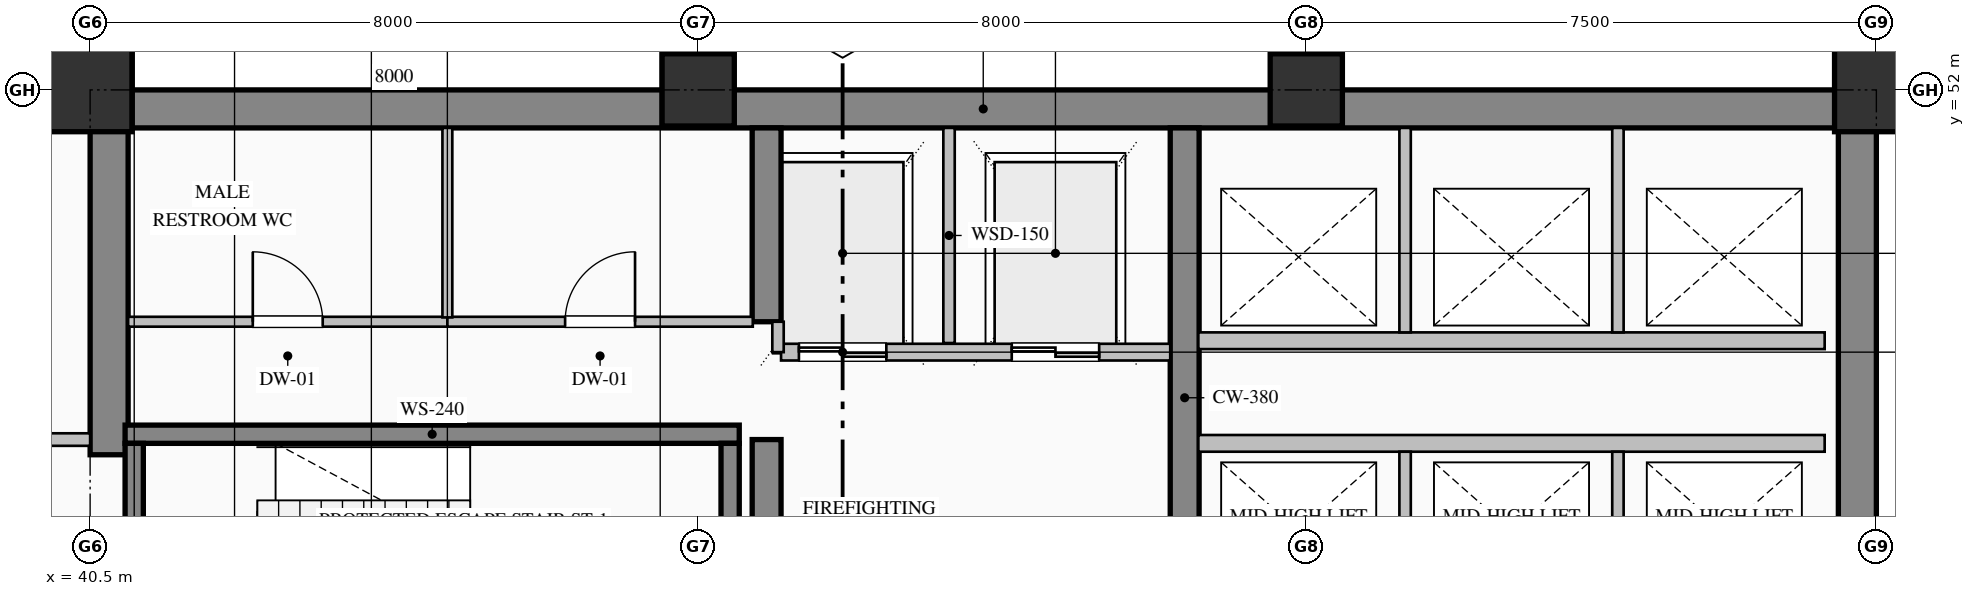
"""IFC4 building model, lengths in metres.
Left out: names, types, materials, properties, quantities, classifications, styles, units other than length and angle.
Written with IfcOpenShell. Run it as: python <this file> out.ifc"""

import sys

from ifc_helpers import new_model, si_unit, direction, frame, frame_2d, origin, origin_2d, place, context, subcontext, project, spatial, rectangle, hollow_rectangle, extrude, element, fill, save


model = new_model("IFC4")
c1 = context("Model", 3, precision=1e-05, world=origin(), true_north=direction((0.0, 1.0)))
c2 = subcontext(c1, "Body", "Model", "MODEL_VIEW")
j1 = project(units=[si_unit("LENGTHUNIT", "METRE"), si_unit("PLANEANGLEUNIT", "RADIAN")], contexts=[c1])
p1 = place(None, origin())
s1 = spatial("IfcSite", under=j1, at=p1, CompositionType="ELEMENT")
p2 = place(p1, origin())
s2 = spatial("IfcBuilding", under=s1, at=p2, CompositionType="ELEMENT")
p3 = place(p2, frame((0.0, 0.0, 135.0)))
s3 = spatial("IfcBuildingStorey", under=s2, at=p3, CompositionType="ELEMENT", Elevation=135.0)
p4 = place(p3, frame((40.5, 51.75, 0.0), z_axis=(0.0, 0.0, 1.0), x_axis=(1.0, 0.0, 0.0)))
e1 = element("IfcWall", 1, at=p4, inside=s3, PredefinedType="SHEAR", context=c2, shape_type="SweptSolid", body=[
    extrude(rectangle(XDim=23.5, YDim=0.5, at=frame_2d((11.75, 0.0))), origin(), (0.0, 0.0, 1.0), 3.765),
])
p5 = place(p3, frame((63.75, 36.32, 0.0), z_axis=(0.0, 0.0, 1.0), x_axis=(0.0, 1.0, 0.0)))
e2 = element("IfcWall", 2, at=p5, inside=s3, PredefinedType="SHEAR", context=c2, shape_type="SweptSolid", body=[
    extrude(rectangle(XDim=15.18, YDim=0.5, at=frame_2d((7.59, 0.0))), origin(), (0.0, 0.0, 1.0), 3.765),
])
p6 = place(p3, frame((40.75, 47.2, 0.0), z_axis=(0.0, 0.0, 1.0), x_axis=(0.0, 1.0, 0.0)))
e3 = element("IfcWall", 3, at=p6, inside=s3, PredefinedType="SHEAR", context=c2, shape_type="SweptSolid", body=[
    extrude(rectangle(XDim=4.3, YDim=0.5, at=frame_2d((2.15, 0.0))), origin(), (0.0, 0.0, 1.0), 3.765),
])
p7 = place(p3, frame((49.4, 44.4, 0.0), z_axis=(0.0, 0.0, 1.0), x_axis=(0.0, 1.0, 0.0)))
e4 = element("IfcWall", 4, at=p7, inside=s3, PredefinedType="SHEAR", context=c2, shape_type="SweptSolid", body=[
    extrude(rectangle(XDim=3.0, YDim=0.38, at=frame_2d((1.5, 0.0))), origin(), (0.0, 0.0, 1.0), 3.765),
])
p8 = place(p3, frame((49.4, 48.95, 0.0), z_axis=(0.0, 0.0, 1.0), x_axis=(0.0, 1.0, 0.0)))
e5 = element("IfcWall", 5, at=p8, inside=s3, PredefinedType="SHEAR", context=c2, shape_type="SweptSolid", body=[
    extrude(rectangle(XDim=2.55, YDim=0.38, at=frame_2d((1.275, 0.0))), origin(), (0.0, 0.0, 1.0), 3.765),
])
p9 = place(p3, frame((54.9, 44.4, 0.0), z_axis=(0.0, 0.0, 1.0), x_axis=(0.0, 1.0, 0.0)))
e6 = element("IfcWall", 6, at=p9, inside=s3, PredefinedType="SHEAR", context=c2, shape_type="SweptSolid", body=[
    extrude(rectangle(XDim=7.1, YDim=0.38, at=frame_2d((3.55, 0.0))), origin(), (0.0, 0.0, 1.0), 3.765),
])
p10 = place(p3, frame((40.5, 52.0, 0.0), z_axis=(0.0, 0.0, 1.0), x_axis=(1.0, 0.0, 0.0)))
e7 = element("IfcColumn", 7, at=p10, inside=s3, PredefinedType="COLUMN", context=c2, shape_type="SweptSolid", body=[
    extrude(hollow_rectangle(XDim=1.1, YDim=1.1, WallThickness=0.04, at=origin_2d()), origin(), (0.0, 0.0, 1.0), 4.0),
])
for number, where, z_axis, x_axis in (
    (8, (48.5, 52.0, 0.0), (0.0, 0.0, 1.0), (1.0, 0.0, 0.0)),
    (9, (56.5, 52.0, 0.0), (0.0, 0.0, 1.0), (1.0, 0.0, 0.0)),
):
    element("IfcColumn", number, at=place(p3, frame(where, z_axis=z_axis, x_axis=x_axis)), inside=s3, PredefinedType="COLUMN", context=c2, shape_type="SweptSolid", body=[
        extrude(hollow_rectangle(XDim=0.95, YDim=0.95, WallThickness=0.036, at=origin_2d()), origin(), (0.0, 0.0, 1.0), 4.0),
    ])
p11 = place(p3, frame((64.0, 52.0, 0.0), z_axis=(0.0, 0.0, 1.0), x_axis=(1.0, 0.0, 0.0)))
e10 = element("IfcColumn", 10, at=p11, inside=s3, PredefinedType="COLUMN", context=c2, shape_type="SweptSolid", body=[
    extrude(hollow_rectangle(XDim=1.1, YDim=1.1, WallThickness=0.04, at=origin_2d()), origin(), (0.0, 0.0, 1.0), 4.0),
])
p12 = place(p3, frame((13.0, 51.83, 0.0), z_axis=(0.0, 0.0, 1.0), x_axis=(1.0, 0.0, 0.0)))
e11 = element("IfcWall", 11, at=p12, inside=s3, PredefinedType="SOLIDWALL", context=c2, shape_type="SweptSolid", body=[
    extrude(rectangle(XDim=27.52, YDim=0.34, at=frame_2d((13.76, 0.0))), origin(), (0.0, 0.0, 1.0), 3.265),
])
p13 = place(p12, frame((6.6, 0.0, 0.7)))
e12 = element("IfcOpeningElement", 12, at=p13, cuts=e11, PredefinedType="OPENING", context=c2, shape_type="SweptSolid", body=[
    extrude(rectangle(XDim=1.2, YDim=1.85, at=frame_2d((0.6, 0.925))), frame((0.0, 0.18, 0.0), z_axis=(0.0, -1.0, 0.0), x_axis=(1.0, 0.0, 0.0)), (0.0, 0.0, 1.0), 0.36),
])
p14 = place(p12, frame((13.575, 0.0, 0.85)))
e13 = element("IfcOpeningElement", 13, at=p14, cuts=e11, PredefinedType="OPENING", context=c2, shape_type="SweptSolid", body=[
    extrude(rectangle(XDim=1.65, YDim=1.95, at=frame_2d((0.825, 0.975))), frame((0.0, 0.18, 0.0), z_axis=(0.0, -1.0, 0.0), x_axis=(1.0, 0.0, 0.0)), (0.0, 0.0, 1.0), 0.36),
])
p15 = place(p3, frame((40.96, 47.47, 0.0), z_axis=(0.0, 0.0, 1.0), x_axis=(1.0, 0.0, 0.0)))
e14 = element("IfcWall", 14, at=p15, inside=s3, PredefinedType="SOLIDWALL", context=c2, shape_type="SweptSolid", body=[
    extrude(rectangle(XDim=8.08, YDim=0.24, at=frame_2d((4.04, 0.0))), origin(), (0.0, 0.0, 1.0), 4.0),
])
p16 = place(p3, frame((41.08, 47.35, 0.0), z_axis=(0.0, 0.0, 1.0), x_axis=(0.0, -1.0, 0.0)))
e15 = element("IfcWall", 15, at=p16, inside=s3, PredefinedType="SOLIDWALL", context=c2, shape_type="SweptSolid", body=[
    extrude(rectangle(XDim=3.15, YDim=0.24, at=frame_2d((1.575, 0.0))), origin(), (0.0, 0.0, 1.0), 4.0),
])
p17 = place(p16, frame((1.0, 0.0, 0.0)))
e16 = element("IfcOpeningElement", 16, at=p17, cuts=e15, PredefinedType="OPENING", context=c2, shape_type="SweptSolid", body=[
    extrude(rectangle(XDim=1.15, YDim=2.2, at=frame_2d((0.575, 1.1))), frame((0.0, 0.13, 0.0), z_axis=(0.0, -1.0, 0.0), x_axis=(1.0, 0.0, 0.0)), (0.0, 0.0, 1.0), 0.26),
])
p18 = place(p3, frame((48.92, 44.2, 0.0), z_axis=(0.0, 0.0, 1.0), x_axis=(0.0, 1.0, 0.0)))
e17 = element("IfcWall", 17, at=p18, inside=s3, PredefinedType="SOLIDWALL", context=c2, shape_type="SweptSolid", body=[
    extrude(rectangle(XDim=3.15, YDim=0.24, at=frame_2d((1.575, 0.0))), origin(), (0.0, 0.0, 1.0), 4.0),
])
p19 = place(p3, frame((54.71, 48.55, 0.0), z_axis=(0.0, 0.0, 1.0), x_axis=(-1.0, 0.0, 0.0)))
e18 = element("IfcWall", 18, at=p19, inside=s3, PredefinedType="PARTITIONING", context=c2, shape_type="SweptSolid", body=[
    extrude(rectangle(XDim=5.12, YDim=0.22, at=frame_2d((2.56, 0.0))), origin(), (0.0, 0.0, 1.0), 3.765),
])
p20 = place(p19, frame((3.735, 0.0, 0.0)))
e19 = element("IfcOpeningElement", 19, at=p20, cuts=e18, PredefinedType="OPENING", context=c2, shape_type="SweptSolid", body=[
    extrude(rectangle(XDim=1.15, YDim=2.2, at=frame_2d((0.575, 1.1))), frame((0.0, 0.12, 0.0), z_axis=(0.0, -1.0, 0.0), x_axis=(1.0, 0.0, 0.0)), (0.0, 0.0, 1.0), 0.24),
])
p21 = place(p19, frame((0.935, 0.0, 0.0)))
e20 = element("IfcOpeningElement", 20, at=p21, cuts=e18, PredefinedType="OPENING", context=c2, shape_type="SweptSolid", body=[
    extrude(rectangle(XDim=1.15, YDim=2.2, at=frame_2d((0.575, 1.1))), frame((0.0, 0.12, 0.0), z_axis=(0.0, -1.0, 0.0), x_axis=(1.0, 0.0, 0.0)), (0.0, 0.0, 1.0), 0.24),
])
p22 = place(p3, frame((51.8, 48.67, 0.0), z_axis=(0.0, 0.0, 1.0), x_axis=(0.0, 1.0, 0.0)))
e21 = element("IfcWall", 21, at=p22, inside=s3, PredefinedType="PARTITIONING", context=c2, shape_type="SweptSolid", body=[
    extrude(rectangle(XDim=2.83, YDim=0.15, at=frame_2d((1.415, 0.0))), origin(), (0.0, 0.0, 1.0), 3.765),
])
p23 = place(p3, frame((49.55, 48.55, 0.0), z_axis=(0.0, 0.0, 1.0), x_axis=(0.0, 1.0, 0.0)))
e22 = element("IfcWall", 22, at=p23, inside=s3, PredefinedType="PARTITIONING", context=c2, shape_type="SweptSolid", body=[
    extrude(rectangle(XDim=0.4, YDim=0.15, at=frame_2d((0.2, 0.0))), origin(), (0.0, 0.0, 1.0), 3.765),
])
p24 = place(p3, frame((55.08, 47.35, 0.0), z_axis=(0.0, 0.0, 1.0), x_axis=(1.0, 0.0, 0.0)))
e23 = element("IfcWall", 23, at=p24, inside=s3, PredefinedType="PARTITIONING", context=c2, shape_type="SweptSolid", body=[
    extrude(rectangle(XDim=8.24, YDim=0.22, at=frame_2d((4.12, 0.0))), origin(), (0.0, 0.0, 1.0), 3.765),
])
for number, where, z_axis, x_axis in (
    (24, (57.8, 45.21, 0.0), (0.0, 0.0, 1.0), (0.0, 1.0, 0.0)),
    (25, (60.6, 45.21, 0.0), (0.0, 0.0, 1.0), (0.0, 1.0, 0.0)),
):
    element("IfcWall", number, at=place(p3, frame(where, z_axis=z_axis, x_axis=x_axis)), inside=s3, PredefinedType="PARTITIONING", context=c2, shape_type="SweptSolid", body=[
        extrude(rectangle(XDim=2.03, YDim=0.15, at=frame_2d((1.015, 0.0))), origin(), (0.0, 0.0, 1.0), 3.765),
    ])
p25 = place(p3, frame((63.32, 48.7, 0.0), z_axis=(0.0, 0.0, 1.0), x_axis=(-1.0, 0.0, 0.0)))
e26 = element("IfcWall", 26, at=p25, inside=s3, PredefinedType="PARTITIONING", context=c2, shape_type="SweptSolid", body=[
    extrude(rectangle(XDim=8.24, YDim=0.22, at=frame_2d((4.12, 0.0))), origin(), (0.0, 0.0, 1.0), 3.765),
])
for number, where, z_axis, x_axis in (
    (27, (57.8, 48.81, 0.0), (0.0, 0.0, 1.0), (0.0, 1.0, 0.0)),
    (28, (60.6, 48.81, 0.0), (0.0, 0.0, 1.0), (0.0, 1.0, 0.0)),
):
    element("IfcWall", number, at=place(p3, frame(where, z_axis=z_axis, x_axis=x_axis)), inside=s3, PredefinedType="PARTITIONING", context=c2, shape_type="SweptSolid", body=[
        extrude(rectangle(XDim=2.69, YDim=0.15, at=frame_2d((1.345, 0.0))), origin(), (0.0, 0.0, 1.0), 3.765),
    ])
p26 = place(p3, frame((37.8, 47.4, 0.0), z_axis=(0.0, 0.0, 1.0), x_axis=(1.0, 0.0, 0.0)))
e29 = element("IfcWall", 29, at=p26, inside=s3, PredefinedType="PARTITIONING", context=c2, shape_type="SweptSolid", body=[
    extrude(rectangle(XDim=2.7, YDim=0.165, at=frame_2d((1.35, 0.0))), origin(), (0.0, 0.0, 1.0), 3.765),
])
p27 = place(p26, frame((0.825, 0.0, 0.0)))
e30 = element("IfcOpeningElement", 30, at=p27, cuts=e29, PredefinedType="OPENING", context=c2, shape_type="SweptSolid", body=[
    extrude(rectangle(XDim=1.05, YDim=2.15, at=frame_2d((0.525, 1.075))), frame((0.0, 0.093, 0.0), z_axis=(0.0, -1.0, 0.0), x_axis=(1.0, 0.0, 0.0)), (0.0, 0.0, 1.0), 0.185),
])
p28 = place(p3, frame((41.0, 48.95, 0.0), z_axis=(0.0, 0.0, 1.0), x_axis=(1.0, 0.0, 0.0)))
e31 = element("IfcWall", 31, at=p28, inside=s3, PredefinedType="PARTITIONING", context=c2, shape_type="SweptSolid", body=[
    extrude(rectangle(XDim=4.2, YDim=0.13, at=frame_2d((2.1, 0.0))), origin(), (0.0, 0.0, 1.0), 3.765),
])
p29 = place(p28, frame((1.64, 0.0, 0.0)))
e32 = element("IfcOpeningElement", 32, at=p29, cuts=e31, PredefinedType="OPENING", context=c2, shape_type="SweptSolid", body=[
    extrude(rectangle(XDim=0.92, YDim=2.15, at=frame_2d((0.46, 1.075))), frame((0.0, 0.075, 0.0), z_axis=(0.0, -1.0, 0.0), x_axis=(1.0, 0.0, 0.0)), (0.0, 0.0, 1.0), 0.15),
])
p30 = place(p3, frame((45.2, 48.95, 0.0), z_axis=(0.0, 0.0, 1.0), x_axis=(1.0, 0.0, 0.0)))
e33 = element("IfcWall", 33, at=p30, inside=s3, PredefinedType="PARTITIONING", context=c2, shape_type="SweptSolid", body=[
    extrude(rectangle(XDim=4.018, YDim=0.13, at=frame_2d((2.009, 0.0))), origin(), (0.0, 0.0, 1.0), 3.765),
])
p31 = place(p30, frame((1.549, 0.0, 0.0)))
e34 = element("IfcOpeningElement", 34, at=p31, cuts=e33, PredefinedType="OPENING", context=c2, shape_type="SweptSolid", body=[
    extrude(rectangle(XDim=0.92, YDim=2.15, at=frame_2d((0.46, 1.075))), frame((0.0, 0.075, 0.0), z_axis=(0.0, -1.0, 0.0), x_axis=(1.0, 0.0, 0.0)), (0.0, 0.0, 1.0), 0.15),
])
p32 = place(p3, frame((45.2, 51.5, 0.0), z_axis=(0.0, 0.0, 1.0), x_axis=(0.0, -1.0, 0.0)))
e35 = element("IfcWall", 35, at=p32, inside=s3, PredefinedType="PARTITIONING", context=c2, shape_type="SweptSolid", body=[
    extrude(rectangle(XDim=2.493, YDim=0.13, at=frame_2d((1.247, 0.0))), origin(), (0.0, 0.0, 1.0), 3.765),
])
p33 = place(p20, origin())
e36 = element("IfcDoor", 36, at=p33, inside=s3, OperationType="DOUBLE_DOOR_SLIDING", PredefinedType="DOOR", context=c2, shape_type="SweptSolid", body=[
    extrude(rectangle(XDim=1.15, YDim=2.2, at=frame_2d((0.575, 1.1))), frame((0.0, 0.025, 0.0), z_axis=(0.0, -1.0, 0.0), x_axis=(1.0, 0.0, 0.0)), (0.0, 0.0, 1.0), 0.05),
])
fill(e19, e36)
p34 = place(p21, origin())
e37 = element("IfcDoor", 37, at=p34, inside=s3, OperationType="DOUBLE_DOOR_SLIDING", PredefinedType="DOOR", context=c2, shape_type="SweptSolid", body=[
    extrude(rectangle(XDim=1.15, YDim=2.2, at=frame_2d((0.575, 1.1))), frame((0.0, 0.025, 0.0), z_axis=(0.0, -1.0, 0.0), x_axis=(1.0, 0.0, 0.0)), (0.0, 0.0, 1.0), 0.05),
])
fill(e20, e37)
p35 = place(p29, origin())
e38 = element("IfcDoor", 38, at=p35, inside=s3, OperationType="SINGLE_SWING_LEFT", PredefinedType="DOOR", context=c2, shape_type="SweptSolid", body=[
    extrude(rectangle(XDim=0.92, YDim=2.15, at=frame_2d((0.46, 1.075))), frame((0.0, 0.025, 0.0), z_axis=(0.0, -1.0, 0.0), x_axis=(1.0, 0.0, 0.0)), (0.0, 0.0, 1.0), 0.05),
])
fill(e32, e38)
p36 = place(p31, origin())
e39 = element("IfcDoor", 39, at=p36, inside=s3, OperationType="SINGLE_SWING_RIGHT", PredefinedType="DOOR", context=c2, shape_type="SweptSolid", body=[
    extrude(rectangle(XDim=0.92, YDim=2.15, at=frame_2d((0.46, 1.075))), frame((0.0, 0.025, 0.0), z_axis=(0.0, -1.0, 0.0), x_axis=(1.0, 0.0, 0.0)), (0.0, 0.0, 1.0), 0.05),
])
fill(e34, e39)
save(model, sys.argv[1])
